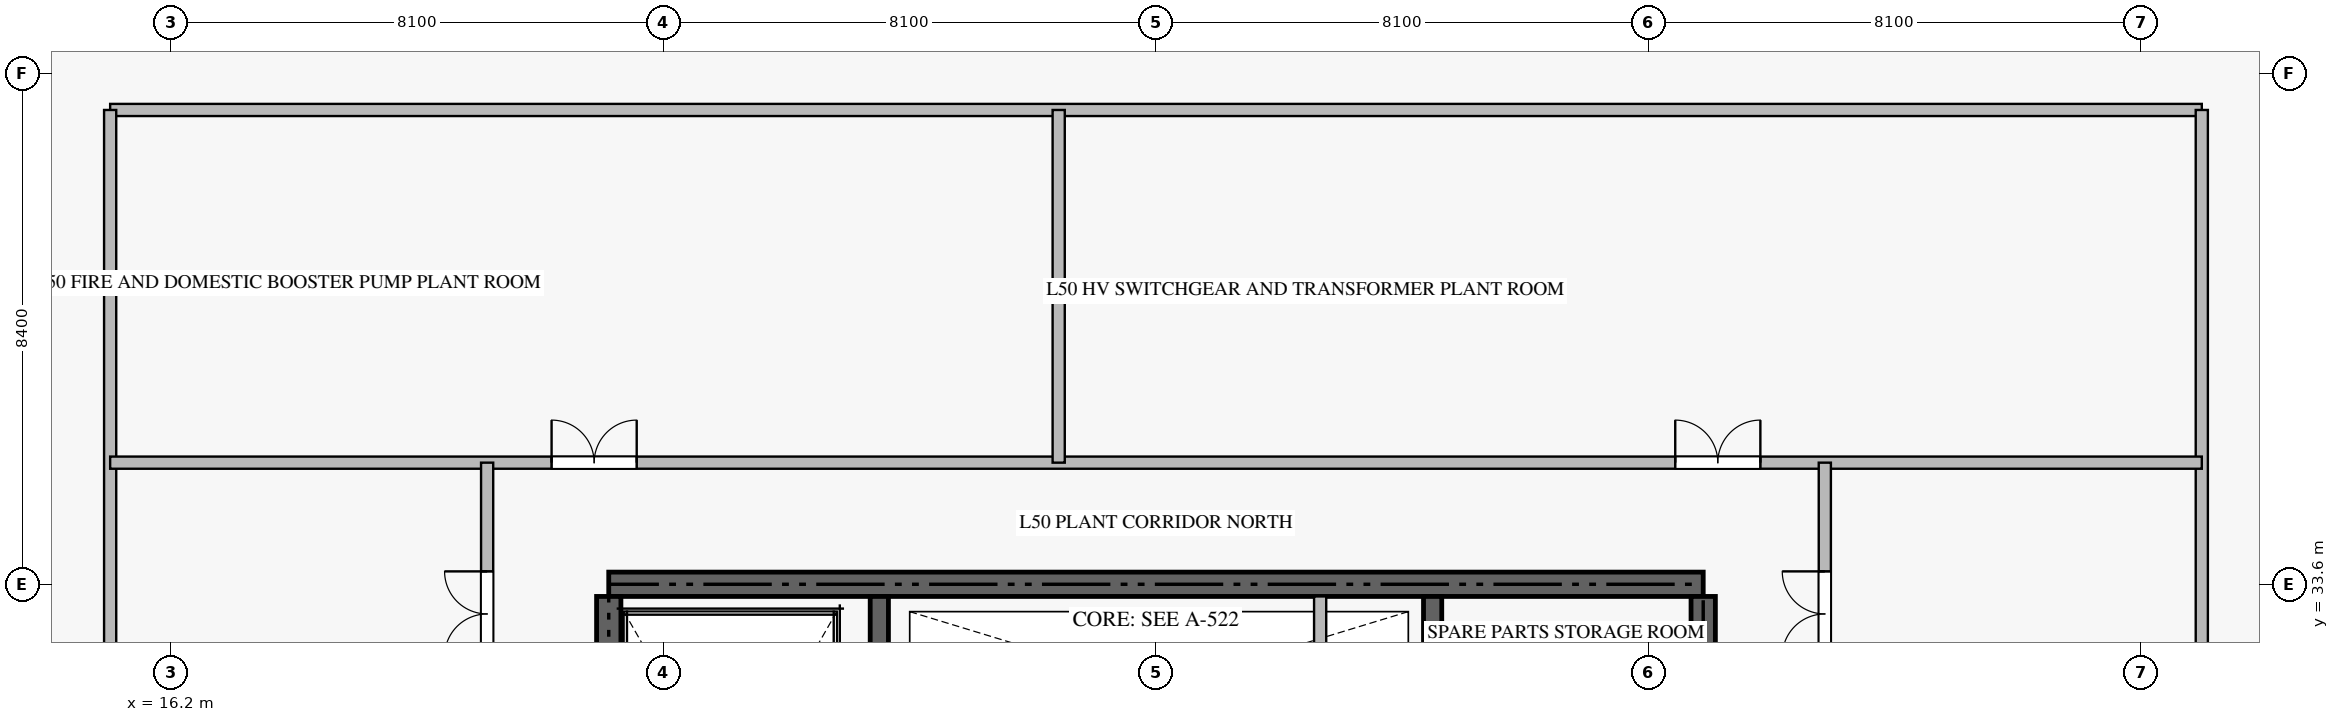
"""IFC4 building model, lengths in metres.
Left out: names, types, materials, properties, quantities, classifications, styles, units other than length and angle.
Written with IfcOpenShell. Run it as: python <this file> out.ifc"""

import sys

from ifc_helpers import new_model, si_unit, direction, frame, frame_2d, origin, place, context, subcontext, project, spatial, rectangle, extrude, source, transform, mapped, element, fill, save


model = new_model("IFC4")
c1 = context("Model", 3, precision=1e-05, world=origin(), true_north=direction((0.0, 1.0)))
c2 = subcontext(c1, "Body", "Model", "MODEL_VIEW")
j1 = project(units=[si_unit("LENGTHUNIT", "METRE"), si_unit("PLANEANGLEUNIT", "RADIAN")], contexts=[c1])
p1 = place(None, origin())
s1 = spatial("IfcSite", under=j1, at=p1, CompositionType="ELEMENT")
p2 = place(p1, origin())
s2 = spatial("IfcBuilding", under=s1, at=p2, CompositionType="ELEMENT")
p3 = place(p2, frame((0.0, 0.0, 198.9)))
s3 = spatial("IfcBuildingStorey", under=s2, at=p3, CompositionType="ELEMENT", Elevation=198.9)
p4 = place(p3, frame((41.4, 33.6, -0.44), z_axis=(0.0, 0.0, 1.0), x_axis=(-1.0, 0.0, 0.0)))
e1 = element("IfcWall", 1, at=p4, inside=s3, PredefinedType="SHEAR", context=c2, shape_type="SweptSolid", body=[
    extrude(rectangle(XDim=18.0, YDim=0.4, at=frame_2d((9.0, 0.0))), origin(), (0.0, 0.0, 1.0), 6.078),
])
p5 = place(p3, frame((23.4, 24.25, -0.44), z_axis=(0.0, 0.0, 1.0), x_axis=(0.0, 1.0, 0.0)))
e2 = element("IfcWall", 2, at=p5, inside=s3, PredefinedType="SHEAR", context=c2, shape_type="SweptSolid", body=[
    extrude(rectangle(XDim=9.15, YDim=0.4, at=frame_2d((4.575, 0.0))), origin(), (0.0, 0.0, 1.0), 6.078),
])
p6 = place(p3, frame((41.4, 27.75, -0.44), z_axis=(0.0, 0.0, 1.0), x_axis=(0.0, 1.0, 0.0)))
e3 = element("IfcWall", 3, at=p6, inside=s3, PredefinedType="SHEAR", context=c2, shape_type="SweptSolid", body=[
    extrude(rectangle(XDim=5.65, YDim=0.4, at=frame_2d((2.825, 0.0))), origin(), (0.0, 0.0, 1.0), 6.078),
])
p7 = place(p3, frame((27.85, 23.55, -0.44), z_axis=(0.0, 0.0, 1.0), x_axis=(0.0, 1.0, 0.0)))
e4 = element("IfcWall", 4, at=p7, inside=s3, PredefinedType="SHEAR", context=c2, shape_type="SweptSolid", body=[
    extrude(rectangle(XDim=9.85, YDim=0.3, at=frame_2d((4.925, 0.0))), origin(), (0.0, 0.0, 1.0), 6.078),
])
p8 = place(p3, frame((36.95, 27.05, -0.44), z_axis=(0.0, 0.0, 1.0), x_axis=(0.0, 1.0, 0.0)))
e5 = element("IfcWall", 5, at=p8, inside=s3, PredefinedType="SHEAR", context=c2, shape_type="SweptSolid", body=[
    extrude(rectangle(XDim=6.35, YDim=0.3, at=frame_2d((3.175, 0.0))), origin(), (0.0, 0.0, 1.0), 6.078),
])
p9 = place(p3, frame((35.1, 30.75, 0.0), z_axis=(0.0, 0.0, 1.0), x_axis=(0.0, 1.0, 0.0)))
e6 = element("IfcWall", 6, at=p9, inside=s3, PredefinedType="STANDARD", context=c2, shape_type="SweptSolid", body=[
    extrude(rectangle(XDim=2.65, YDim=0.2, at=frame_2d((1.325, 0.0))), origin(), (0.0, 0.0, 1.0), 5.64),
])
p10 = place(p3, frame((15.2, 41.4, 0.0), z_axis=(0.0, 0.0, 1.0), x_axis=(1.0, 0.0, 0.0)))
e7 = element("IfcWall", 7, at=p10, inside=s3, PredefinedType="STANDARD", context=c2, shape_type="SweptSolid", body=[
    extrude(rectangle(XDim=34.4, YDim=0.2, at=frame_2d((17.2, 0.0))), origin(), (0.0, 0.0, 1.0), 5.64),
])
for number, where, z_axis, x_axis in (
    (8, (15.2, 9.0, 0.0), (0.0, 0.0, 1.0), (0.0, 1.0, 0.0)),
    (9, (49.6, 9.0, 0.0), (0.0, 0.0, 1.0), (0.0, 1.0, 0.0)),
):
    element("IfcWall", number, at=place(p3, frame(where, z_axis=z_axis, x_axis=x_axis)), inside=s3, PredefinedType="STANDARD", context=c2, shape_type="SweptSolid", body=[
        extrude(rectangle(XDim=32.4, YDim=0.2, at=frame_2d((16.2, 0.0))), origin(), (0.0, 0.0, 1.0), 5.64),
    ])
p11 = place(p3, frame((15.2, 35.6, 0.0), z_axis=(0.0, 0.0, 1.0), x_axis=(1.0, 0.0, 0.0)))
e10 = element("IfcWall", 10, at=p11, inside=s3, PredefinedType="STANDARD", context=c2, shape_type="SweptSolid", body=[
    extrude(rectangle(XDim=34.4, YDim=0.2, at=frame_2d((17.2, 0.0))), origin(), (0.0, 0.0, 1.0), 5.64),
])
p12 = place(p11, frame((7.26, 0.0, 0.0)))
e11 = element("IfcOpeningElement", 11, at=p12, cuts=e10, PredefinedType="OPENING", context=c2, shape_type="SweptSolid", body=[
    extrude(rectangle(XDim=1.4, YDim=2.2, at=frame_2d((0.7, 1.1))), frame((0.0, 0.11, 0.0), z_axis=(0.0, -1.0, 0.0), x_axis=(1.0, 0.0, 0.0)), (0.0, 0.0, 1.0), 0.22),
])
p13 = place(p11, frame((25.74, 0.0, 0.0)))
e12 = element("IfcOpeningElement", 12, at=p13, cuts=e10, PredefinedType="OPENING", context=c2, shape_type="SweptSolid", body=[
    extrude(rectangle(XDim=1.4, YDim=2.2, at=frame_2d((0.7, 1.1))), frame((0.0, 0.11, 0.0), z_axis=(0.0, -1.0, 0.0), x_axis=(1.0, 0.0, 0.0)), (0.0, 0.0, 1.0), 0.22),
])
p14 = place(p3, frame((30.8, 35.6, 0.0), z_axis=(0.0, 0.0, 1.0), x_axis=(0.0, 1.0, 0.0)))
e13 = element("IfcWall", 13, at=p14, inside=s3, PredefinedType="STANDARD", context=c2, shape_type="SweptSolid", body=[
    extrude(rectangle(XDim=5.8, YDim=0.2, at=frame_2d((2.9, 0.0))), origin(), (0.0, 0.0, 1.0), 5.64),
])
p15 = place(p3, frame((21.4, 26.75, 0.0), z_axis=(0.0, 0.0, 1.0), x_axis=(0.0, 1.0, 0.0)))
e14 = element("IfcWall", 14, at=p15, inside=s3, PredefinedType="STANDARD", context=c2, shape_type="SweptSolid", body=[
    extrude(rectangle(XDim=8.85, YDim=0.2, at=frame_2d((4.425, 0.0))), origin(), (0.0, 0.0, 1.0), 5.64),
])
p16 = place(p15, frame((5.662, 0.0, 0.0)))
e15 = element("IfcOpeningElement", 15, at=p16, cuts=e14, PredefinedType="OPENING", context=c2, shape_type="SweptSolid", body=[
    extrude(rectangle(XDim=1.4, YDim=2.2, at=frame_2d((0.7, 1.1))), frame((0.0, 0.11, 0.0), z_axis=(0.0, -1.0, 0.0), x_axis=(1.0, 0.0, 0.0)), (0.0, 0.0, 1.0), 0.22),
])
p17 = place(p3, frame((43.4, 26.75, 0.0), z_axis=(0.0, 0.0, 1.0), x_axis=(0.0, 1.0, 0.0)))
e16 = element("IfcWall", 16, at=p17, inside=s3, PredefinedType="STANDARD", context=c2, shape_type="SweptSolid", body=[
    extrude(rectangle(XDim=8.85, YDim=0.2, at=frame_2d((4.425, 0.0))), origin(), (0.0, 0.0, 1.0), 5.64),
])
p18 = place(p17, frame((5.662, 0.0, 0.0)))
e17 = element("IfcOpeningElement", 17, at=p18, cuts=e16, PredefinedType="OPENING", context=c2, shape_type="SweptSolid", body=[
    extrude(rectangle(XDim=1.4, YDim=2.2, at=frame_2d((0.7, 1.1))), frame((0.0, 0.11, 0.0), z_axis=(0.0, -1.0, 0.0), x_axis=(1.0, 0.0, 0.0)), (0.0, 0.0, 1.0), 0.22),
])
m1 = source(origin(), c2, "Body", "SweptSolid", [
    extrude(rectangle(XDim=1.4, YDim=2.2, at=frame_2d((0.7, 1.1))), frame((0.0, 0.025, 0.0), z_axis=(0.0, -1.0, 0.0), x_axis=(1.0, 0.0, 0.0)), (0.0, 0.0, 1.0), 0.05),
])
p19 = place(p12, origin())
e18 = element("IfcDoor", 18, at=p19, inside=s3, OperationType="DOUBLE_DOOR_SINGLE_SWING", PredefinedType="DOOR", context=c2, shape_type="MappedRepresentation", body=[
    mapped(m1, transform((0.0, 0.0, 0.0), scale=1.0)),
])
fill(e11, e18)
p20 = place(p13, origin())
e19 = element("IfcDoor", 19, at=p20, inside=s3, OperationType="DOUBLE_DOOR_SINGLE_SWING", PredefinedType="DOOR", context=c2, shape_type="MappedRepresentation", body=[
    mapped(m1, transform((0.0, 0.0, 0.0), scale=1.0)),
])
fill(e12, e19)
p21 = place(p16, origin())
e20 = element("IfcDoor", 20, at=p21, inside=s3, OperationType="DOUBLE_DOOR_SINGLE_SWING", PredefinedType="DOOR", context=c2, shape_type="MappedRepresentation", body=[
    mapped(m1, transform((0.0, 0.0, 0.0), scale=1.0)),
])
fill(e15, e20)
p22 = place(p18, origin())
e21 = element("IfcDoor", 21, at=p22, inside=s3, OperationType="DOUBLE_DOOR_SINGLE_SWING", PredefinedType="DOOR", context=c2, shape_type="MappedRepresentation", body=[
    mapped(m1, transform((0.0, 0.0, 0.0), scale=1.0)),
])
fill(e17, e21)
save(model, sys.argv[1])
